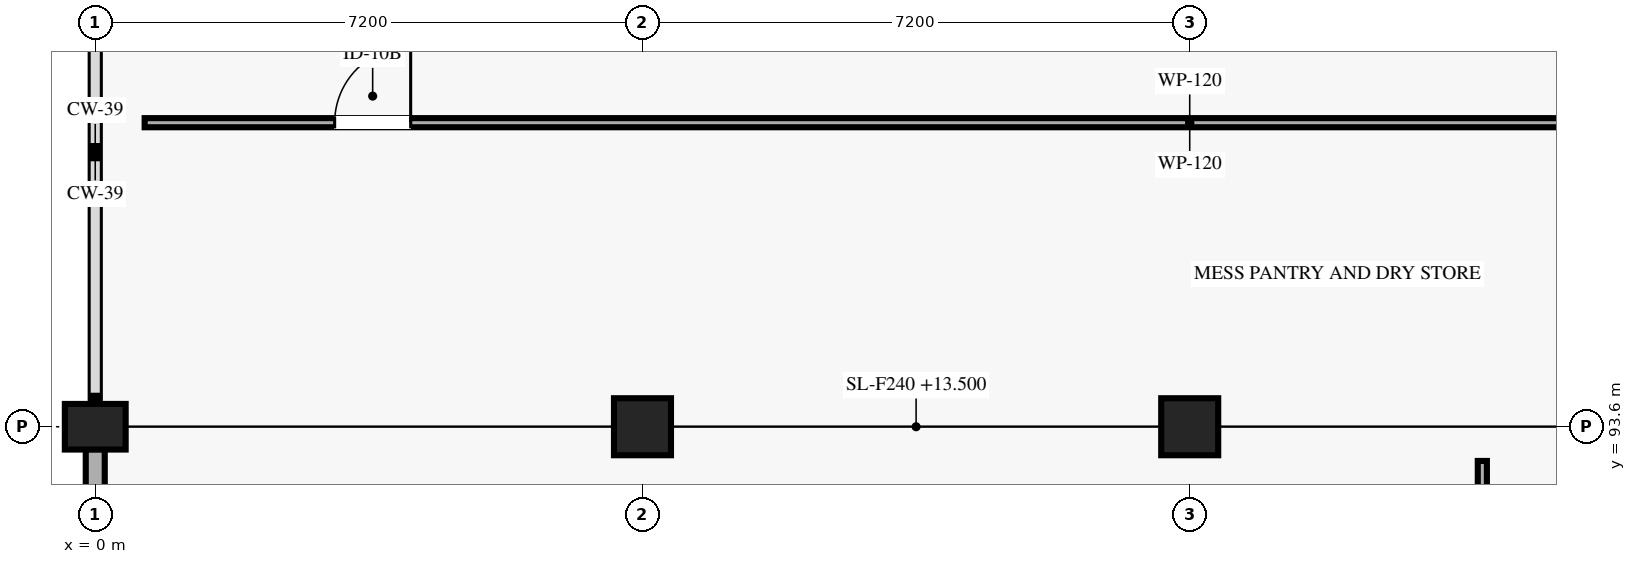
"""IFC4 building model, lengths in metres.
Left out: names, types, materials, properties, quantities, classifications, styles, units other than length and angle.
Written with IfcOpenShell. Run it as: python <this file> out.ifc"""

import sys

from ifc_helpers import new_model, si_unit, direction, frame, frame_2d, origin, origin_2d, place, context, subcontext, project, spatial, rectangle, extrude, element, fill, save


model = new_model("IFC4")
c1 = context("Model", 3, precision=1e-05, world=origin(), true_north=direction((0.0, 1.0)))
c2 = subcontext(c1, "Body", "Model", "MODEL_VIEW")
j1 = project(units=[si_unit("LENGTHUNIT", "METRE"), si_unit("PLANEANGLEUNIT", "RADIAN")], contexts=[c1])
p1 = place(None, origin())
s1 = spatial("IfcSite", under=j1, at=p1, CompositionType="ELEMENT")
p2 = place(p1, origin())
s2 = spatial("IfcBuilding", under=s1, at=p2, CompositionType="ELEMENT")
p3 = place(p2, frame((0.0, 0.0, 13.5)))
s3 = spatial("IfcBuildingStorey", under=s2, at=p3, CompositionType="ELEMENT", Elevation=13.5)
p4 = place(p3, frame((0.0, 93.6, 0.0), z_axis=(0.0, 0.0, 1.0), x_axis=(0.0, 1.0, 0.0)))
e1 = element("IfcColumn", 1, at=p4, inside=s3, PredefinedType="COLUMN", context=c2, shape_type="SweptSolid", body=[
    extrude(rectangle(XDim=0.6, YDim=0.8, at=origin_2d()), origin(), (0.0, 0.0, 1.0), 4.05),
])
for number, where, z_axis, x_axis in (
    (2, (7.2, 93.6, 0.0), (0.0, 0.0, 1.0), (1.0, 0.0, 0.0)),
    (3, (14.4, 93.6, 0.0), (0.0, 0.0, 1.0), (1.0, 0.0, 0.0)),
):
    element("IfcColumn", number, at=place(p3, frame(where, z_axis=z_axis, x_axis=x_axis)), inside=s3, PredefinedType="COLUMN", context=c2, shape_type="SweptSolid", body=[
        extrude(rectangle(XDim=0.75, YDim=0.75, at=origin_2d()), origin(), (0.0, 0.0, 1.0), 4.05),
    ])
p5 = place(p3, frame((0.0, 86.695, 0.0), z_axis=(0.0, 0.0, 1.0), x_axis=(0.0, 1.0, 0.0)))
e4 = element("IfcWall", 4, at=p5, inside=s3, PredefinedType="SOLIDWALL", context=c2, shape_type="SweptSolid", body=[
    extrude(rectangle(XDim=6.61, YDim=0.25, at=frame_2d((3.305, 0.0))), origin(), (0.0, 0.0, 1.0), 3.195),
])
p6 = place(p5, frame((1.705, 0.0, 0.85)))
e5 = element("IfcOpeningElement", 5, at=p6, cuts=e4, PredefinedType="OPENING", context=c2, shape_type="SweptSolid", body=[
    extrude(rectangle(XDim=3.2, YDim=1.95, at=frame_2d((1.6, 0.975))), frame((0.0, 0.135, 0.0), z_axis=(0.0, -1.0, 0.0), x_axis=(1.0, 0.0, 0.0)), (0.0, 0.0, 1.0), 0.27),
])
p7 = place(p3, frame((0.65, 97.6, 0.0), z_axis=(0.0, 0.0, 1.0), x_axis=(1.0, 0.0, 0.0)))
e6 = element("IfcWall", 6, at=p7, inside=s3, PredefinedType="PARTITIONING", context=c2, shape_type="SweptSolid", body=[
    extrude(rectangle(XDim=27.5, YDim=0.12, at=frame_2d((13.75, 0.0))), origin(), (0.0, 0.0, 1.0), 3.81),
])
p8 = place(p7, frame((2.5, 0.0, 0.0)))
e7 = element("IfcOpeningElement", 7, at=p8, cuts=e6, PredefinedType="OPENING", context=c2, shape_type="SweptSolid", body=[
    extrude(rectangle(XDim=1.0, YDim=2.1, at=frame_2d((0.5, 1.05))), frame((0.0, 0.07, 0.0), z_axis=(0.0, -1.0, 0.0), x_axis=(1.0, 0.0, 0.0)), (0.0, 0.0, 1.0), 0.14),
])
p9 = place(p3, frame((18.25, 72.6, 0.0), z_axis=(0.0, 0.0, 1.0), x_axis=(0.0, 1.0, 0.0)))
e8 = element("IfcWall", 8, at=p9, inside=s3, PredefinedType="PARTITIONING", context=c2, shape_type="SweptSolid", body=[
    extrude(rectangle(XDim=20.55, YDim=0.12, at=frame_2d((10.275, 0.0))), origin(), (0.0, 0.0, 1.0), 3.81),
])
p10 = place(p9, frame((2.5, 0.0, 0.0)))
e9 = element("IfcOpeningElement", 9, at=p10, cuts=e8, PredefinedType="OPENING", context=c2, shape_type="SweptSolid", body=[
    extrude(rectangle(XDim=1.05, YDim=2.15, at=frame_2d((0.525, 1.075))), frame((0.0, 0.07, 0.0), z_axis=(0.0, -1.0, 0.0), x_axis=(1.0, 0.0, 0.0)), (0.0, 0.0, 1.0), 0.14),
])
p11 = place(p8, origin())
e10 = element("IfcDoor", 10, at=p11, inside=s3, OperationType="SINGLE_SWING_RIGHT", PredefinedType="DOOR", context=c2, shape_type="SweptSolid", body=[
    extrude(rectangle(XDim=1.0, YDim=2.1, at=frame_2d((0.5, 1.05))), frame((0.0, 0.025, 0.0), z_axis=(0.0, -1.0, 0.0), x_axis=(1.0, 0.0, 0.0)), (0.0, 0.0, 1.0), 0.05),
])
fill(e7, e10)
save(model, sys.argv[1])
